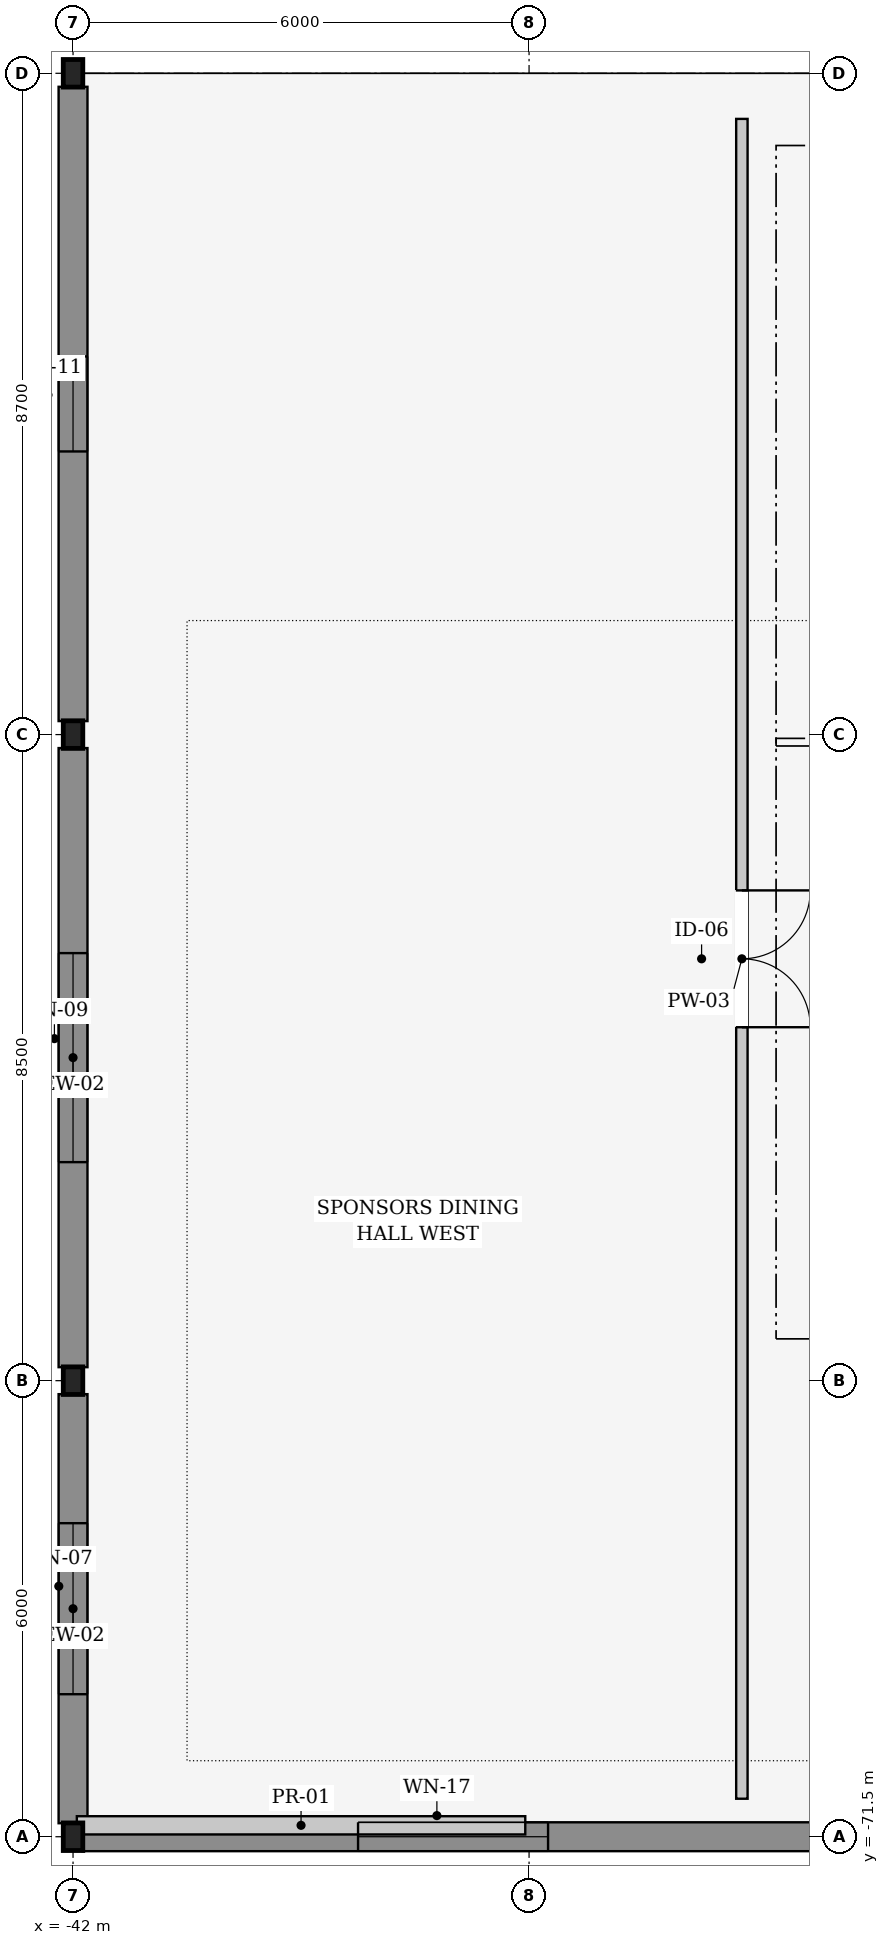
"""IFC4 building model, lengths in metres.
Left out: names, types, materials, properties, quantities, classifications, styles, units other than length and angle.
Written with IfcOpenShell. Run it as: python <this file> out.ifc"""

import sys

from ifc_helpers import new_model, si_unit, direction, frame, frame_2d, origin, origin_2d, place, context, subcontext, project, spatial, rectangle, i_section, extrude, element, fill, save


model = new_model("IFC4")
c1 = context("Model", 3, precision=1e-05, world=origin(), true_north=direction((0.0, 1.0)))
c2 = subcontext(c1, "Body", "Model", "MODEL_VIEW")
j1 = project(units=[si_unit("LENGTHUNIT", "METRE"), si_unit("PLANEANGLEUNIT", "RADIAN")], contexts=[c1])
p1 = place(None, origin())
s1 = spatial("IfcSite", under=j1, at=p1, CompositionType="ELEMENT")
p2 = place(p1, origin())
s2 = spatial("IfcBuilding", under=s1, at=p2, CompositionType="ELEMENT")
p3 = place(p2, frame((0.0, 0.0, 11.4)))
s3 = spatial("IfcBuildingStorey", under=s2, at=p3, CompositionType="ELEMENT", Elevation=11.4)
for number, where, z_axis, x_axis in (
    (1, (-42.0, -71.5, 0.0), (0.0, 0.0, 1.0), (1.0, 0.0, 0.0)),
    (2, (-42.0, -65.5, 0.0), (0.0, 0.0, 1.0), (1.0, 0.0, 0.0)),
    (3, (-42.0, -57.0, 0.0), (0.0, 0.0, 1.0), (1.0, 0.0, 0.0)),
    (4, (-42.0, -48.3, 0.0), (0.0, 0.0, 1.0), (1.0, 0.0, 0.0)),
):
    element("IfcColumn", number, at=place(p3, frame(where, z_axis=z_axis, x_axis=x_axis)), inside=s3, PredefinedType="COLUMN", context=c2, shape_type="SweptSolid", body=[
        extrude(i_section(OverallWidth=0.257, OverallDepth=0.363, WebThickness=0.013, FlangeThickness=0.022, at=origin_2d()), origin(), (0.0, 0.0, 1.0), 4.8),
    ])
p4 = place(p3, frame((-42.0, -71.323, 0.0), z_axis=(0.0, 0.0, 1.0), x_axis=(0.0, 1.0, 0.0)))
e5 = element("IfcWall", 5, at=p4, inside=s3, PredefinedType="SOLIDWALL", context=c2, shape_type="SweptSolid", body=[
    extrude(rectangle(XDim=5.645, YDim=0.38, at=frame_2d((2.823, 0.0))), origin(), (0.0, 0.0, 1.0), 3.66),
])
p5 = place(p4, frame((1.698, 0.0, 0.95)))
e6 = element("IfcOpeningElement", 6, at=p5, cuts=e5, PredefinedType="OPENING", context=c2, shape_type="SweptSolid", body=[
    extrude(rectangle(XDim=2.25, YDim=1.25, at=frame_2d((1.125, 0.625))), frame((0.0, 0.2, 0.0), z_axis=(0.0, -1.0, 0.0), x_axis=(1.0, 0.0, 0.0)), (0.0, 0.0, 1.0), 0.4),
])
p6 = place(p3, frame((-42.0, -65.323, 0.0), z_axis=(0.0, 0.0, 1.0), x_axis=(0.0, 1.0, 0.0)))
e7 = element("IfcWall", 7, at=p6, inside=s3, PredefinedType="SOLIDWALL", context=c2, shape_type="SweptSolid", body=[
    extrude(rectangle(XDim=8.145, YDim=0.38, at=frame_2d((4.073, 0.0))), origin(), (0.0, 0.0, 1.0), 3.66),
])
p7 = place(p6, frame((2.698, 0.0, 0.95)))
e8 = element("IfcOpeningElement", 8, at=p7, cuts=e7, PredefinedType="OPENING", context=c2, shape_type="SweptSolid", body=[
    extrude(rectangle(XDim=2.75, YDim=1.25, at=frame_2d((1.375, 0.625))), frame((0.0, 0.2, 0.0), z_axis=(0.0, -1.0, 0.0), x_axis=(1.0, 0.0, 0.0)), (0.0, 0.0, 1.0), 0.4),
])
p8 = place(p3, frame((-42.0, -56.823, 0.0), z_axis=(0.0, 0.0, 1.0), x_axis=(0.0, 1.0, 0.0)))
e9 = element("IfcWall", 9, at=p8, inside=s3, PredefinedType="SOLIDWALL", context=c2, shape_type="SweptSolid", body=[
    extrude(rectangle(XDim=8.345, YDim=0.38, at=frame_2d((4.172, 0.0))), origin(), (0.0, 0.0, 1.0), 3.66),
])
p9 = place(p8, frame((3.548, 0.0, 0.95)))
e10 = element("IfcOpeningElement", 10, at=p9, cuts=e9, PredefinedType="OPENING", context=c2, shape_type="SweptSolid", body=[
    extrude(rectangle(XDim=1.25, YDim=1.5, at=frame_2d((0.625, 0.75))), frame((0.0, 0.2, 0.0), z_axis=(0.0, -1.0, 0.0), x_axis=(1.0, 0.0, 0.0)), (0.0, 0.0, 1.0), 0.4),
])
p10 = place(p3, frame((-32.125, -71.5, 0.0), z_axis=(0.0, 0.0, 1.0), x_axis=(-1.0, 0.0, 0.0)))
e11 = element("IfcWall", 11, at=p10, inside=s3, PredefinedType="SOLIDWALL", context=c2, shape_type="SweptSolid", body=[
    extrude(rectangle(XDim=9.751, YDim=0.38, at=frame_2d((4.875, 0.0))), origin(), (0.0, 0.0, 1.0), 3.66),
])
p11 = place(p10, frame((3.625, 0.0, 0.9)))
e12 = element("IfcOpeningElement", 12, at=p11, cuts=e11, PredefinedType="OPENING", context=c2, shape_type="SweptSolid", body=[
    extrude(rectangle(XDim=2.5, YDim=1.5, at=frame_2d((1.25, 0.75))), frame((0.0, 0.2, 0.0), z_axis=(0.0, -1.0, 0.0), x_axis=(1.0, 0.0, 0.0)), (0.0, 0.0, 1.0), 0.4),
])
p12 = place(p3, frame((-41.95, -71.35, 4.75), z_axis=(0.0, 0.0, 1.0), x_axis=(1.0, 0.0, 0.0)))
e13 = element("IfcWall", 13, at=p12, inside=s3, PredefinedType="PARAPET", context=c2, shape_type="SweptSolid", body=[
    extrude(rectangle(XDim=5.9, YDim=0.24, at=frame_2d((2.95, 0.0))), origin(), (0.0, 0.0, 1.0), 1.15),
])
p13 = place(p3, frame((-33.2, -48.9, 0.0), z_axis=(0.0, 0.0, 1.0), x_axis=(0.0, -1.0, 0.0)))
e14 = element("IfcWall", 14, at=p13, inside=s3, PredefinedType="PARTITIONING", context=c2, shape_type="SweptSolid", body=[
    extrude(rectangle(XDim=22.1, YDim=0.15, at=frame_2d((11.05, 0.0))), origin(), (0.0, 0.0, 1.0), 3.645),
])
p14 = place(p13, frame((10.15, 0.0, 0.0)))
e15 = element("IfcOpeningElement", 15, at=p14, cuts=e14, PredefinedType="OPENING", context=c2, shape_type="SweptSolid", body=[
    extrude(rectangle(XDim=1.8, YDim=2.2, at=frame_2d((0.9, 1.1))), frame((0.0, 0.085, 0.0), z_axis=(0.0, -1.0, 0.0), x_axis=(1.0, 0.0, 0.0)), (0.0, 0.0, 1.0), 0.17),
])
p15 = place(p5, origin())
e16 = element("IfcWindow", 16, at=p15, inside=s3, PartitioningType="SINGLE_PANEL", PredefinedType="WINDOW", context=c2, shape_type="SweptSolid", body=[
    extrude(rectangle(XDim=2.25, YDim=1.25, at=frame_2d((1.125, 0.625))), frame((0.0, 0.03, 0.0), z_axis=(0.0, -1.0, 0.0), x_axis=(1.0, 0.0, 0.0)), (0.0, 0.0, 1.0), 0.06),
])
fill(e6, e16)
p16 = place(p7, origin())
e17 = element("IfcWindow", 17, at=p16, inside=s3, PartitioningType="SINGLE_PANEL", PredefinedType="WINDOW", context=c2, shape_type="SweptSolid", body=[
    extrude(rectangle(XDim=2.75, YDim=1.25, at=frame_2d((1.375, 0.625))), frame((0.0, 0.03, 0.0), z_axis=(0.0, -1.0, 0.0), x_axis=(1.0, 0.0, 0.0)), (0.0, 0.0, 1.0), 0.06),
])
fill(e8, e17)
p17 = place(p9, origin())
e18 = element("IfcWindow", 18, at=p17, inside=s3, PartitioningType="SINGLE_PANEL", PredefinedType="WINDOW", context=c2, shape_type="SweptSolid", body=[
    extrude(rectangle(XDim=1.25, YDim=1.5, at=frame_2d((0.625, 0.75))), frame((0.0, 0.03, 0.0), z_axis=(0.0, -1.0, 0.0), x_axis=(1.0, 0.0, 0.0)), (0.0, 0.0, 1.0), 0.06),
])
fill(e10, e18)
p18 = place(p11, origin())
e19 = element("IfcWindow", 19, at=p18, inside=s3, PartitioningType="SINGLE_PANEL", PredefinedType="WINDOW", context=c2, shape_type="SweptSolid", body=[
    extrude(rectangle(XDim=2.5, YDim=1.5, at=frame_2d((1.25, 0.75))), frame((0.0, 0.03, 0.0), z_axis=(0.0, -1.0, 0.0), x_axis=(1.0, 0.0, 0.0)), (0.0, 0.0, 1.0), 0.06),
])
fill(e12, e19)
p19 = place(p14, origin())
e20 = element("IfcDoor", 20, at=p19, inside=s3, OperationType="DOUBLE_DOOR_SINGLE_SWING", PredefinedType="DOOR", context=c2, shape_type="SweptSolid", body=[
    extrude(rectangle(XDim=1.8, YDim=2.2, at=frame_2d((0.9, 1.1))), frame((0.0, 0.025, 0.0), z_axis=(0.0, -1.0, 0.0), x_axis=(1.0, 0.0, 0.0)), (0.0, 0.0, 1.0), 0.05),
])
fill(e15, e20)
save(model, sys.argv[1])
